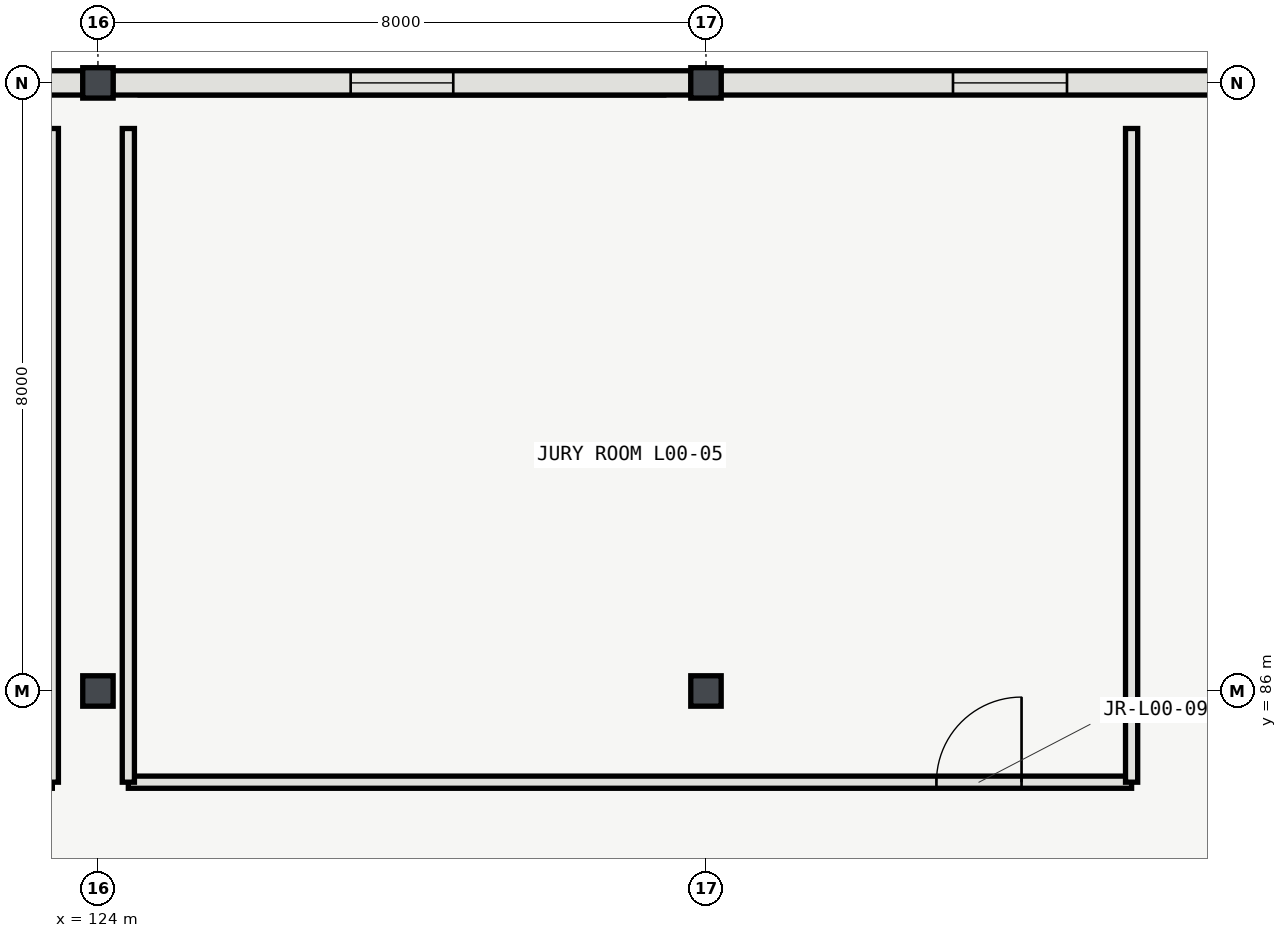
"""IFC4 building model, lengths in metres.
Left out: names, types, materials, properties, quantities, classifications, styles, units other than length and angle.
Written with IfcOpenShell. Run it as: python <this file> out.ifc"""

import sys

from ifc_helpers import new_model, si_unit, direction, frame, frame_2d, origin, origin_2d, place, context, subcontext, project, spatial, rectangle, i_section, extrude, element, fill, save


model = new_model("IFC4")
c1 = context("Model", 3, precision=1e-05, world=origin(), true_north=direction((0.0, 1.0)))
c2 = subcontext(c1, "Body", "Model", "MODEL_VIEW")
j1 = project(units=[si_unit("LENGTHUNIT", "METRE"), si_unit("PLANEANGLEUNIT", "RADIAN")], contexts=[c1])
p1 = place(None, origin())
s1 = spatial("IfcSite", under=j1, at=p1, CompositionType="ELEMENT")
p2 = place(p1, origin())
s2 = spatial("IfcBuilding", under=s1, at=p2, CompositionType="ELEMENT")
p3 = place(p2, origin())
s3 = spatial("IfcBuildingStorey", under=s2, at=p3, CompositionType="ELEMENT", Elevation=0.0)
for number, where, z_axis, x_axis in (
    (1, (124.0, 86.0, 0.0), (0.0, 0.0, 1.0), (1.0, 0.0, 0.0)),
    (2, (124.0, 94.0, 0.0), (0.0, 0.0, 1.0), (1.0, 0.0, 0.0)),
    (3, (132.0, 86.0, 0.0), (0.0, 0.0, 1.0), (1.0, 0.0, 0.0)),
    (4, (132.0, 94.0, 0.0), (0.0, 0.0, 1.0), (1.0, 0.0, 0.0)),
):
    element("IfcColumn", number, at=place(p3, frame(where, z_axis=z_axis, x_axis=x_axis)), inside=s3, PredefinedType="COLUMN", context=c2, shape_type="SweptSolid", body=[
        extrude(i_section(OverallWidth=0.4, OverallDepth=0.4, WebThickness=0.013, FlangeThickness=0.021, FilletRadius=0.022, at=origin_2d()), origin(), (0.0, 0.0, 1.0), 5.4),
    ])
p4 = place(p3, frame((123.804, 94.0, 0.0), z_axis=(0.0, 0.0, 1.0), x_axis=(-1.0, 0.0, 0.0)))
e5 = element("IfcWall", 5, at=p4, inside=s3, PredefinedType="SOLIDWALL", context=c2, shape_type="SweptSolid", body=[
    extrude(rectangle(XDim=7.608, YDim=0.32, at=frame_2d((3.804, 0.0))), origin(), (0.0, 0.0, 1.0), 4.663),
])
p5 = place(p4, frame((3.204, 0.0, 0.95)))
e6 = element("IfcOpeningElement", 6, at=p5, cuts=e5, PredefinedType="OPENING", context=c2, shape_type="SweptSolid", body=[
    extrude(rectangle(XDim=1.2, YDim=1.8, at=frame_2d((0.6, 0.9))), frame((0.0, 0.17, 0.0), z_axis=(0.0, -1.0, 0.0), x_axis=(1.0, 0.0, 0.0)), (0.0, 0.0, 1.0), 0.34),
])
p6 = place(p3, frame((131.804, 94.0, 0.0), z_axis=(0.0, 0.0, 1.0), x_axis=(-1.0, 0.0, 0.0)))
e7 = element("IfcWall", 7, at=p6, inside=s3, PredefinedType="SOLIDWALL", context=c2, shape_type="SweptSolid", body=[
    extrude(rectangle(XDim=7.608, YDim=0.32, at=frame_2d((3.804, 0.0))), origin(), (0.0, 0.0, 1.0), 4.663),
])
p7 = place(p6, frame((3.129, 0.0, 0.95)))
e8 = element("IfcOpeningElement", 8, at=p7, cuts=e7, PredefinedType="OPENING", context=c2, shape_type="SweptSolid", body=[
    extrude(rectangle(XDim=1.35, YDim=1.8, at=frame_2d((0.675, 0.9))), frame((0.0, 0.17, 0.0), z_axis=(0.0, -1.0, 0.0), x_axis=(1.0, 0.0, 0.0)), (0.0, 0.0, 1.0), 0.34),
])
p8 = place(p3, frame((139.804, 94.0, 0.0), z_axis=(0.0, 0.0, 1.0), x_axis=(-1.0, 0.0, 0.0)))
e9 = element("IfcWall", 9, at=p8, inside=s3, PredefinedType="SOLIDWALL", context=c2, shape_type="SweptSolid", body=[
    extrude(rectangle(XDim=7.608, YDim=0.32, at=frame_2d((3.804, 0.0))), origin(), (0.0, 0.0, 1.0), 4.663),
])
p9 = place(p8, frame((3.054, 0.0, 0.95)))
e10 = element("IfcOpeningElement", 10, at=p9, cuts=e9, PredefinedType="OPENING", context=c2, shape_type="SweptSolid", body=[
    extrude(rectangle(XDim=1.5, YDim=1.8, at=frame_2d((0.75, 0.9))), frame((0.0, 0.17, 0.0), z_axis=(0.0, -1.0, 0.0), x_axis=(1.0, 0.0, 0.0)), (0.0, 0.0, 1.0), 0.34),
])
p10 = place(p3, frame((123.4, 84.8, 0.0), z_axis=(0.0, 0.0, 1.0), x_axis=(0.0, 1.0, 0.0)))
e11 = element("IfcWall", 11, at=p10, inside=s3, PredefinedType="PARTITIONING", context=c2, shape_type="SweptSolid", body=[
    extrude(rectangle(XDim=8.6, YDim=0.16, at=frame_2d((4.3, 0.0))), origin(), (0.0, 0.0, 1.0), 5.12),
])
p11 = place(p3, frame((124.4, 84.8, 0.0), z_axis=(0.0, 0.0, 1.0), x_axis=(1.0, 0.0, 0.0)))
e12 = element("IfcWall", 12, at=p11, inside=s3, PredefinedType="PARTITIONING", context=c2, shape_type="SweptSolid", body=[
    extrude(rectangle(XDim=13.2, YDim=0.16, at=frame_2d((6.6, 0.0))), origin(), (0.0, 0.0, 1.0), 5.12),
])
p12 = place(p11, frame((10.632, 0.0, 0.0)))
e13 = element("IfcOpeningElement", 13, at=p12, cuts=e12, PredefinedType="OPENING", context=c2, shape_type="SweptSolid", body=[
    extrude(rectangle(XDim=1.12, YDim=2.2, at=frame_2d((0.56, 1.1))), frame((0.0, 0.09, 0.0), z_axis=(0.0, -1.0, 0.0), x_axis=(1.0, 0.0, 0.0)), (0.0, 0.0, 1.0), 0.18),
])
for number, where, z_axis, x_axis in (
    (14, (124.4, 93.4, 0.0), (0.0, 0.0, 1.0), (0.0, -1.0, 0.0)),
    (15, (137.6, 84.8, 0.0), (0.0, 0.0, 1.0), (0.0, 1.0, 0.0)),
):
    element("IfcWall", number, at=place(p3, frame(where, z_axis=z_axis, x_axis=x_axis)), inside=s3, PredefinedType="PARTITIONING", context=c2, shape_type="SweptSolid", body=[
        extrude(rectangle(XDim=8.6, YDim=0.16, at=frame_2d((4.3, 0.0))), origin(), (0.0, 0.0, 1.0), 5.12),
    ])
p13 = place(p7, origin())
e16 = element("IfcWindow", 16, at=p13, inside=s3, PartitioningType="SINGLE_PANEL", PredefinedType="WINDOW", context=c2, shape_type="SweptSolid", body=[
    extrude(rectangle(XDim=1.35, YDim=1.8, at=frame_2d((0.675, 0.9))), frame((0.0, 0.03, 0.0), z_axis=(0.0, -1.0, 0.0), x_axis=(1.0, 0.0, 0.0)), (0.0, 0.0, 1.0), 0.06),
])
fill(e8, e16)
p14 = place(p9, origin())
e17 = element("IfcWindow", 17, at=p14, inside=s3, PartitioningType="SINGLE_PANEL", PredefinedType="WINDOW", context=c2, shape_type="SweptSolid", body=[
    extrude(rectangle(XDim=1.5, YDim=1.8, at=frame_2d((0.75, 0.9))), frame((0.0, 0.03, 0.0), z_axis=(0.0, -1.0, 0.0), x_axis=(1.0, 0.0, 0.0)), (0.0, 0.0, 1.0), 0.06),
])
fill(e10, e17)
p15 = place(p12, origin())
e18 = element("IfcDoor", 18, at=p15, inside=s3, OperationType="SINGLE_SWING_RIGHT", PredefinedType="DOOR", context=c2, shape_type="SweptSolid", body=[
    extrude(rectangle(XDim=1.12, YDim=2.2, at=frame_2d((0.56, 1.1))), frame((0.0, 0.025, 0.0), z_axis=(0.0, -1.0, 0.0), x_axis=(1.0, 0.0, 0.0)), (0.0, 0.0, 1.0), 0.05),
])
fill(e13, e18)
save(model, sys.argv[1])
